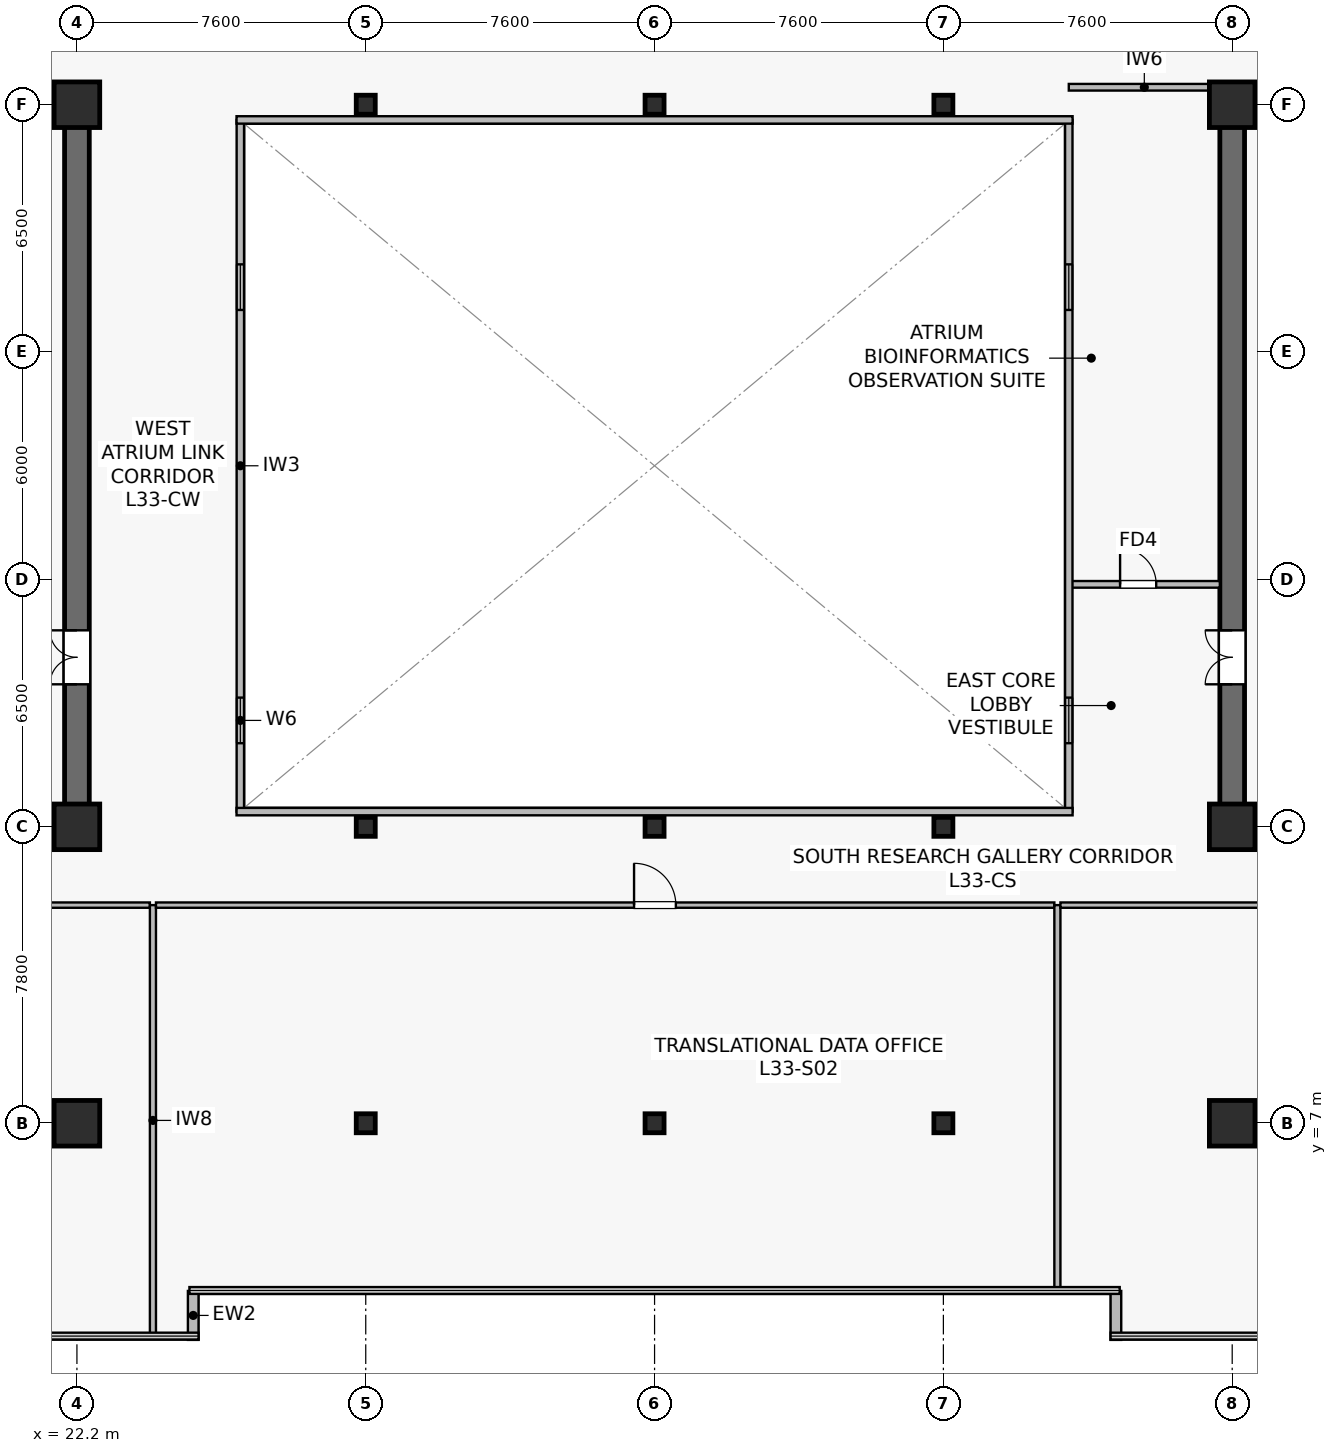
"""IFC4 building model, lengths in metres.
Left out: names, types, materials, properties, quantities, classifications, styles, units other than length and angle.
Written with IfcOpenShell. Run it as: python <this file> out.ifc"""

import sys

from ifc_helpers import new_model, si_unit, direction, frame, frame_2d, origin, origin_2d, place, context, subcontext, project, spatial, rectangle, hollow_rectangle, extrude, source, transform, mapped, element, fill, save


model = new_model("IFC4")
c1 = context("Model", 3, precision=1e-05, world=origin(), true_north=direction((0.0, 1.0)))
c2 = subcontext(c1, "Body", "Model", "MODEL_VIEW")
j1 = project(units=[si_unit("LENGTHUNIT", "METRE"), si_unit("PLANEANGLEUNIT", "RADIAN")], contexts=[c1])
p1 = place(None, origin())
s1 = spatial("IfcSite", under=j1, at=p1, CompositionType="ELEMENT")
p2 = place(p1, origin())
s2 = spatial("IfcBuilding", under=s1, at=p2, CompositionType="ELEMENT")
p3 = place(p2, frame((0.0, 0.0, 137.9)))
s3 = spatial("IfcBuildingStorey", under=s2, at=p3, CompositionType="ELEMENT", Elevation=137.9)
p4 = place(p3, frame((7.075, 14.8, 0.0), z_axis=(0.0, 0.0, 1.0), x_axis=(1.0, 0.0, 0.0)))
e1 = element("IfcWall", 1, at=p4, inside=s3, PredefinedType="SHEAR", context=c2, shape_type="SweptSolid", body=[
    extrude(rectangle(XDim=15.45, YDim=0.65, at=frame_2d((7.725, 0.0))), origin(), (0.0, 0.0, 1.0), 3.79),
])
p5 = place(p3, frame((7.075, 33.8, 0.0), z_axis=(0.0, 0.0, 1.0), x_axis=(1.0, 0.0, 0.0)))
e2 = element("IfcWall", 2, at=p5, inside=s3, PredefinedType="SHEAR", context=c2, shape_type="SweptSolid", body=[
    extrude(rectangle(XDim=15.45, YDim=0.65, at=frame_2d((7.725, 0.0))), origin(), (0.0, 0.0, 1.0), 3.79),
])
p6 = place(p5, frame((5.25, 0.0, 0.0)))
e3 = element("IfcOpeningElement", 3, at=p6, cuts=e2, PredefinedType="OPENING", context=c2, shape_type="SweptSolid", body=[
    extrude(rectangle(XDim=0.95, YDim=2.15, at=frame_2d((0.475, 1.075))), frame((0.0, 0.335, 0.0), z_axis=(0.0, -1.0, 0.0), x_axis=(1.0, 0.0, 0.0)), (0.0, 0.0, 1.0), 0.67),
])
p7 = place(p5, frame((7.765, 0.0, 0.0)))
e4 = element("IfcOpeningElement", 4, at=p7, cuts=e2, PredefinedType="OPENING", context=c2, shape_type="SweptSolid", body=[
    extrude(rectangle(XDim=0.95, YDim=2.15, at=frame_2d((0.475, 1.075))), frame((0.0, 0.335, 0.0), z_axis=(0.0, -1.0, 0.0), x_axis=(1.0, 0.0, 0.0)), (0.0, 0.0, 1.0), 0.67),
])
p8 = place(p5, frame((10.315, 0.0, 0.0)))
e5 = element("IfcOpeningElement", 5, at=p8, cuts=e2, PredefinedType="OPENING", context=c2, shape_type="SweptSolid", body=[
    extrude(rectangle(XDim=0.95, YDim=2.15, at=frame_2d((0.475, 1.075))), frame((0.0, 0.335, 0.0), z_axis=(0.0, -1.0, 0.0), x_axis=(1.0, 0.0, 0.0)), (0.0, 0.0, 1.0), 0.67),
])
p9 = place(p5, frame((12.865, 0.0, 0.0)))
e6 = element("IfcOpeningElement", 6, at=p9, cuts=e2, PredefinedType="OPENING", context=c2, shape_type="SweptSolid", body=[
    extrude(rectangle(XDim=0.95, YDim=2.15, at=frame_2d((0.475, 1.075))), frame((0.0, 0.335, 0.0), z_axis=(0.0, -1.0, 0.0), x_axis=(1.0, 0.0, 0.0)), (0.0, 0.0, 1.0), 0.67),
])
p10 = place(p3, frame((22.2, 15.125, 0.0), z_axis=(0.0, 0.0, 1.0), x_axis=(0.0, 1.0, 0.0)))
e7 = element("IfcWall", 7, at=p10, inside=s3, PredefinedType="SHEAR", context=c2, shape_type="SweptSolid", body=[
    extrude(rectangle(XDim=18.35, YDim=0.65, at=frame_2d((9.175, 0.0))), origin(), (0.0, 0.0, 1.0), 3.79),
])
p11 = place(p10, frame((3.425, 0.0, 0.0)))
e8 = element("IfcOpeningElement", 8, at=p11, cuts=e7, PredefinedType="OPENING", context=c2, shape_type="SweptSolid", body=[
    extrude(rectangle(XDim=1.42, YDim=2.2, at=frame_2d((0.71, 1.1))), frame((0.0, 0.335, 0.0), z_axis=(0.0, -1.0, 0.0), x_axis=(1.0, 0.0, 0.0)), (0.0, 0.0, 1.0), 0.67),
])
p12 = place(p3, frame((52.275, 14.8, 0.0), z_axis=(0.0, 0.0, 1.0), x_axis=(1.0, 0.0, 0.0)))
e9 = element("IfcWall", 9, at=p12, inside=s3, PredefinedType="SHEAR", context=c2, shape_type="SweptSolid", body=[
    extrude(rectangle(XDim=15.45, YDim=0.65, at=frame_2d((7.725, 0.0))), origin(), (0.0, 0.0, 1.0), 3.79),
])
p13 = place(p3, frame((52.275, 33.8, 0.0), z_axis=(0.0, 0.0, 1.0), x_axis=(1.0, 0.0, 0.0)))
e10 = element("IfcWall", 10, at=p13, inside=s3, PredefinedType="SHEAR", context=c2, shape_type="SweptSolid", body=[
    extrude(rectangle(XDim=15.45, YDim=0.65, at=frame_2d((7.725, 0.0))), origin(), (0.0, 0.0, 1.0), 3.79),
])
p14 = place(p13, frame((9.25, 0.0, 0.0)))
e11 = element("IfcOpeningElement", 11, at=p14, cuts=e10, PredefinedType="OPENING", context=c2, shape_type="SweptSolid", body=[
    extrude(rectangle(XDim=0.95, YDim=2.15, at=frame_2d((0.475, 1.075))), frame((0.0, 0.335, 0.0), z_axis=(0.0, -1.0, 0.0), x_axis=(1.0, 0.0, 0.0)), (0.0, 0.0, 1.0), 0.67),
])
p15 = place(p13, frame((6.735, 0.0, 0.0)))
e12 = element("IfcOpeningElement", 12, at=p15, cuts=e10, PredefinedType="OPENING", context=c2, shape_type="SweptSolid", body=[
    extrude(rectangle(XDim=0.95, YDim=2.15, at=frame_2d((0.475, 1.075))), frame((0.0, 0.335, 0.0), z_axis=(0.0, -1.0, 0.0), x_axis=(1.0, 0.0, 0.0)), (0.0, 0.0, 1.0), 0.67),
])
p16 = place(p13, frame((4.185, 0.0, 0.0)))
e13 = element("IfcOpeningElement", 13, at=p16, cuts=e10, PredefinedType="OPENING", context=c2, shape_type="SweptSolid", body=[
    extrude(rectangle(XDim=0.95, YDim=2.15, at=frame_2d((0.475, 1.075))), frame((0.0, 0.335, 0.0), z_axis=(0.0, -1.0, 0.0), x_axis=(1.0, 0.0, 0.0)), (0.0, 0.0, 1.0), 0.67),
])
p17 = place(p13, frame((1.635, 0.0, 0.0)))
e14 = element("IfcOpeningElement", 14, at=p17, cuts=e10, PredefinedType="OPENING", context=c2, shape_type="SweptSolid", body=[
    extrude(rectangle(XDim=0.95, YDim=2.15, at=frame_2d((0.475, 1.075))), frame((0.0, 0.335, 0.0), z_axis=(0.0, -1.0, 0.0), x_axis=(1.0, 0.0, 0.0)), (0.0, 0.0, 1.0), 0.67),
])
p18 = place(p3, frame((52.6, 15.125, 0.0), z_axis=(0.0, 0.0, 1.0), x_axis=(0.0, 1.0, 0.0)))
e15 = element("IfcWall", 15, at=p18, inside=s3, PredefinedType="SHEAR", context=c2, shape_type="SweptSolid", body=[
    extrude(rectangle(XDim=18.35, YDim=0.65, at=frame_2d((9.175, 0.0))), origin(), (0.0, 0.0, 1.0), 3.79),
])
p19 = place(p18, frame((3.425, 0.0, 0.0)))
e16 = element("IfcOpeningElement", 16, at=p19, cuts=e15, PredefinedType="OPENING", context=c2, shape_type="SweptSolid", body=[
    extrude(rectangle(XDim=1.42, YDim=2.2, at=frame_2d((0.71, 1.1))), frame((0.0, 0.335, 0.0), z_axis=(0.0, -1.0, 0.0), x_axis=(1.0, 0.0, 0.0)), (0.0, 0.0, 1.0), 0.67),
])
m1 = source(origin(), c2, "Body", "SweptSolid", [
    extrude(rectangle(XDim=1.2, YDim=1.2, at=origin_2d()), origin(), (0.0, 0.0, 1.0), 4.1),
])
for number, where, z_axis, x_axis in (
    (17, (22.2, 7.0, 0.0), (0.0, 0.0, 1.0), (1.0, 0.0, 0.0)),
    (18, (22.2, 14.8, 0.0), (0.0, 0.0, 1.0), (1.0, 0.0, 0.0)),
    (19, (22.2, 33.8, 0.0), (0.0, 0.0, 1.0), (1.0, 0.0, 0.0)),
    (20, (52.6, 7.0, 0.0), (0.0, 0.0, 1.0), (1.0, 0.0, 0.0)),
    (21, (52.6, 14.8, 0.0), (0.0, 0.0, 1.0), (1.0, 0.0, 0.0)),
    (22, (52.6, 33.8, 0.0), (0.0, 0.0, 1.0), (1.0, 0.0, 0.0)),
):
    element("IfcColumn", number, at=place(p3, frame(where, z_axis=z_axis, x_axis=x_axis)), inside=s3, PredefinedType="COLUMN", context=c2, shape_type="MappedRepresentation", body=[
        mapped(m1, transform((0.0, 0.0, 0.0), scale=1.0)),
    ])
m2 = source(origin(), c2, "Body", "SweptSolid", [
    extrude(hollow_rectangle(XDim=0.5, YDim=0.5, WallThickness=0.022, at=origin_2d()), origin(), (0.0, 0.0, 1.0), 4.1),
])
for number, where, z_axis, x_axis in (
    (23, (29.8, 7.0, 0.0), (0.0, 0.0, 1.0), (1.0, 0.0, 0.0)),
    (24, (29.8, 14.8, 0.0), (0.0, 0.0, 1.0), (1.0, 0.0, 0.0)),
    (25, (29.8, 33.8, 0.0), (0.0, 0.0, 1.0), (1.0, 0.0, 0.0)),
    (26, (37.4, 7.0, 0.0), (0.0, 0.0, 1.0), (1.0, 0.0, 0.0)),
    (27, (37.4, 14.8, 0.0), (0.0, 0.0, 1.0), (1.0, 0.0, 0.0)),
    (28, (37.4, 33.8, 0.0), (0.0, 0.0, 1.0), (1.0, 0.0, 0.0)),
    (29, (45.0, 7.0, 0.0), (0.0, 0.0, 1.0), (1.0, 0.0, 0.0)),
    (30, (45.0, 14.8, 0.0), (0.0, 0.0, 1.0), (1.0, 0.0, 0.0)),
    (31, (45.0, 33.8, 0.0), (0.0, 0.0, 1.0), (1.0, 0.0, 0.0)),
):
    element("IfcColumn", number, at=place(p3, frame(where, z_axis=z_axis, x_axis=x_axis)), inside=s3, PredefinedType="COLUMN", context=c2, shape_type="MappedRepresentation", body=[
        mapped(m2, transform((0.0, 0.0, 0.0), scale=1.0)),
    ])
for number, where, z_axis, x_axis in (
    (32, (25.26, 1.3, 0.0), (0.0, 0.0, 1.0), (0.0, 1.0, 0.0)),
    (33, (49.54, 2.588, 0.0), (0.0, 0.0, 1.0), (0.0, -1.0, 0.0)),
):
    element("IfcWall", number, at=place(p3, frame(where, z_axis=z_axis, x_axis=x_axis)), inside=s3, PredefinedType="STANDARD", context=c2, shape_type="SweptSolid", body=[
        extrude(rectangle(XDim=1.288, YDim=0.28, at=frame_2d((0.644, 0.0))), origin(), (0.0, 0.0, 1.0), 3.79),
    ])
p20 = place(p3, frame((48.3, 34.26, 0.0), z_axis=(0.0, 0.0, 1.0), x_axis=(1.0, 0.0, 0.0)))
e34 = element("IfcWall", 34, at=p20, inside=s3, PredefinedType="PARTITIONING", context=c2, shape_type="SweptSolid", body=[
    extrude(rectangle(XDim=3.975, YDim=0.175, at=frame_2d((1.987, 0.0))), origin(), (0.0, 0.0, 1.0), 3.475),
])
p21 = place(p3, frame((48.3, 21.18, 0.0), z_axis=(0.0, 0.0, 1.0), x_axis=(1.0, 0.0, 0.0)))
e35 = element("IfcWall", 35, at=p21, inside=s3, PredefinedType="PARTITIONING", context=c2, shape_type="SweptSolid", body=[
    extrude(rectangle(XDim=3.975, YDim=0.175, at=frame_2d((1.987, 0.0))), origin(), (0.0, 0.0, 1.0), 3.79),
])
p22 = place(p21, frame((1.35, 0.0, 0.0)))
e36 = element("IfcOpeningElement", 36, at=p22, cuts=e35, PredefinedType="OPENING", context=c2, shape_type="SweptSolid", body=[
    extrude(rectangle(XDim=0.95, YDim=2.15, at=frame_2d((0.475, 1.075))), frame((0.0, 0.098, 0.0), z_axis=(0.0, -1.0, 0.0), x_axis=(1.0, 0.0, 0.0)), (0.0, 0.0, 1.0), 0.195),
])
p23 = place(p3, frame((26.5, 15.2, 0.0), z_axis=(0.0, 0.0, 1.0), x_axis=(0.0, 1.0, 0.0)))
e37 = element("IfcWall", 37, at=p23, inside=s3, PredefinedType="SOLIDWALL", context=c2, shape_type="SweptSolid", body=[
    extrude(rectangle(XDim=18.2, YDim=0.195, at=frame_2d((9.1, 0.0))), origin(), (0.0, 0.0, 1.0), 3.79),
])
p24 = place(p23, frame((1.8, 0.0, 0.9)))
e38 = element("IfcOpeningElement", 38, at=p24, cuts=e37, PredefinedType="OPENING", context=c2, shape_type="SweptSolid", body=[
    extrude(rectangle(XDim=1.2, YDim=1.35, at=frame_2d((0.6, 0.675))), frame((0.0, 0.107, 0.0), z_axis=(0.0, -1.0, 0.0), x_axis=(1.0, 0.0, 0.0)), (0.0, 0.0, 1.0), 0.215),
])
p25 = place(p23, frame((13.2, 0.0, 0.9)))
e39 = element("IfcOpeningElement", 39, at=p25, cuts=e37, PredefinedType="OPENING", context=c2, shape_type="SweptSolid", body=[
    extrude(rectangle(XDim=1.2, YDim=1.35, at=frame_2d((0.6, 0.675))), frame((0.0, 0.107, 0.0), z_axis=(0.0, -1.0, 0.0), x_axis=(1.0, 0.0, 0.0)), (0.0, 0.0, 1.0), 0.215),
])
p26 = place(p3, frame((48.3, 15.2, 0.0), z_axis=(0.0, 0.0, 1.0), x_axis=(0.0, 1.0, 0.0)))
e40 = element("IfcWall", 40, at=p26, inside=s3, PredefinedType="SOLIDWALL", context=c2, shape_type="SweptSolid", body=[
    extrude(rectangle(XDim=18.2, YDim=0.195, at=frame_2d((9.1, 0.0))), origin(), (0.0, 0.0, 1.0), 3.79),
])
p27 = place(p26, frame((1.8, 0.0, 0.9)))
e41 = element("IfcOpeningElement", 41, at=p27, cuts=e40, PredefinedType="OPENING", context=c2, shape_type="SweptSolid", body=[
    extrude(rectangle(XDim=1.2, YDim=1.35, at=frame_2d((0.6, 0.675))), frame((0.0, 0.107, 0.0), z_axis=(0.0, -1.0, 0.0), x_axis=(1.0, 0.0, 0.0)), (0.0, 0.0, 1.0), 0.215),
])
p28 = place(p26, frame((13.2, 0.0, 0.9)))
e42 = element("IfcOpeningElement", 42, at=p28, cuts=e40, PredefinedType="OPENING", context=c2, shape_type="SweptSolid", body=[
    extrude(rectangle(XDim=1.2, YDim=1.35, at=frame_2d((0.6, 0.675))), frame((0.0, 0.107, 0.0), z_axis=(0.0, -1.0, 0.0), x_axis=(1.0, 0.0, 0.0)), (0.0, 0.0, 1.0), 0.215),
])
for number, where, z_axis, x_axis in (
    (43, (26.4, 15.2, 0.0), (0.0, 0.0, 1.0), (1.0, 0.0, 0.0)),
    (44, (26.4, 33.4, 0.0), (0.0, 0.0, 1.0), (1.0, 0.0, 0.0)),
):
    element("IfcWall", number, at=place(p3, frame(where, z_axis=z_axis, x_axis=x_axis)), inside=s3, PredefinedType="SOLIDWALL", context=c2, shape_type="SweptSolid", body=[
        extrude(rectangle(XDim=22.0, YDim=0.195, at=frame_2d((11.0, 0.0))), origin(), (0.0, 0.0, 1.0), 3.79),
    ])
p29 = place(p3, frame((6.98, 12.74, 0.0), z_axis=(0.0, 0.0, 1.0), x_axis=(1.0, 0.0, 0.0)))
e45 = element("IfcWall", 45, at=p29, inside=s3, PredefinedType="PARTITIONING", context=c2, shape_type="SweptSolid", body=[
    extrude(rectangle(XDim=17.14, YDim=0.14, at=frame_2d((8.57, 0.0))), origin(), (0.0, 0.0, 1.0), 3.125),
])
p30 = place(p29, frame((7.1, 0.0, 0.0)))
e46 = element("IfcOpeningElement", 46, at=p30, cuts=e45, PredefinedType="OPENING", context=c2, shape_type="SweptSolid", body=[
    extrude(rectangle(XDim=1.1, YDim=2.18, at=frame_2d((0.55, 1.09))), frame((0.0, 0.08, 0.0), z_axis=(0.0, -1.0, 0.0), x_axis=(1.0, 0.0, 0.0)), (0.0, 0.0, 1.0), 0.16),
])
p31 = place(p3, frame((24.2, 1.41, 0.0), z_axis=(0.0, 0.0, 1.0), x_axis=(0.0, 1.0, 0.0)))
e47 = element("IfcWall", 47, at=p31, inside=s3, PredefinedType="PARTITIONING", context=c2, shape_type="SweptSolid", body=[
    extrude(rectangle(XDim=11.33, YDim=0.16, at=frame_2d((5.665, 0.0))), origin(), (0.0, 0.0, 1.0), 3.075),
])
p32 = place(p3, frame((24.28, 12.74, 0.0), z_axis=(0.0, 0.0, 1.0), x_axis=(1.0, 0.0, 0.0)))
e48 = element("IfcWall", 48, at=p32, inside=s3, PredefinedType="PARTITIONING", context=c2, shape_type="SweptSolid", body=[
    extrude(rectangle(XDim=23.64, YDim=0.14, at=frame_2d((11.82, 0.0))), origin(), (0.0, 0.0, 1.0), 3.125),
])
p33 = place(p32, frame((12.58, 0.0, 0.0)))
e49 = element("IfcOpeningElement", 49, at=p33, cuts=e48, PredefinedType="OPENING", context=c2, shape_type="SweptSolid", body=[
    extrude(rectangle(XDim=1.1, YDim=2.18, at=frame_2d((0.55, 1.09))), frame((0.0, 0.08, 0.0), z_axis=(0.0, -1.0, 0.0), x_axis=(1.0, 0.0, 0.0)), (0.0, 0.0, 1.0), 0.16),
])
p34 = place(p3, frame((48.0, 2.61, 0.0), z_axis=(0.0, 0.0, 1.0), x_axis=(0.0, 1.0, 0.0)))
e50 = element("IfcWall", 50, at=p34, inside=s3, PredefinedType="PARTITIONING", context=c2, shape_type="SweptSolid", body=[
    extrude(rectangle(XDim=10.13, YDim=0.16, at=frame_2d((5.065, 0.0))), origin(), (0.0, 0.0, 1.0), 3.075),
])
p35 = place(p3, frame((48.08, 12.74, 0.0), z_axis=(0.0, 0.0, 1.0), x_axis=(1.0, 0.0, 0.0)))
e51 = element("IfcWall", 51, at=p35, inside=s3, PredefinedType="PARTITIONING", context=c2, shape_type="SweptSolid", body=[
    extrude(rectangle(XDim=19.74, YDim=0.14, at=frame_2d((9.87, 0.0))), origin(), (0.0, 0.0, 1.0), 3.125),
])
p36 = place(p35, frame((8.244, 0.0, 0.0)))
e52 = element("IfcOpeningElement", 52, at=p36, cuts=e51, PredefinedType="OPENING", context=c2, shape_type="SweptSolid", body=[
    extrude(rectangle(XDim=1.1, YDim=2.18, at=frame_2d((0.55, 1.09))), frame((0.0, 0.08, 0.0), z_axis=(0.0, -1.0, 0.0), x_axis=(1.0, 0.0, 0.0)), (0.0, 0.0, 1.0), 0.16),
])
m3 = source(origin(), c2, "Body", "SweptSolid", [
    extrude(rectangle(XDim=1.2, YDim=1.35, at=frame_2d((0.6, 0.675))), frame((0.0, 0.03, 0.0), z_axis=(0.0, -1.0, 0.0), x_axis=(1.0, 0.0, 0.0)), (0.0, 0.0, 1.0), 0.06),
])
p37 = place(p24, origin())
e53 = element("IfcWindow", 53, at=p37, inside=s3, PartitioningType="SINGLE_PANEL", PredefinedType="WINDOW", context=c2, shape_type="MappedRepresentation", body=[
    mapped(m3, transform((0.0, 0.0, 0.0), scale=1.0)),
])
fill(e38, e53)
p38 = place(p25, origin())
e54 = element("IfcWindow", 54, at=p38, inside=s3, PartitioningType="SINGLE_PANEL", PredefinedType="WINDOW", context=c2, shape_type="MappedRepresentation", body=[
    mapped(m3, transform((0.0, 0.0, 0.0), scale=1.0)),
])
fill(e39, e54)
p39 = place(p27, origin())
e55 = element("IfcWindow", 55, at=p39, inside=s3, PartitioningType="SINGLE_PANEL", PredefinedType="WINDOW", context=c2, shape_type="MappedRepresentation", body=[
    mapped(m3, transform((0.0, 0.0, 0.0), scale=1.0)),
])
fill(e41, e55)
p40 = place(p28, origin())
e56 = element("IfcWindow", 56, at=p40, inside=s3, PartitioningType="SINGLE_PANEL", PredefinedType="WINDOW", context=c2, shape_type="MappedRepresentation", body=[
    mapped(m3, transform((0.0, 0.0, 0.0), scale=1.0)),
])
fill(e42, e56)
m4 = source(origin(), c2, "Body", "SweptSolid", [
    extrude(rectangle(XDim=1.42, YDim=2.2, at=frame_2d((0.71, 1.1))), frame((0.0, 0.025, 0.0), z_axis=(0.0, -1.0, 0.0), x_axis=(1.0, 0.0, 0.0)), (0.0, 0.0, 1.0), 0.05),
])
p41 = place(p11, origin())
e57 = element("IfcDoor", 57, at=p41, inside=s3, OperationType="DOUBLE_DOOR_SINGLE_SWING", PredefinedType="DOOR", context=c2, shape_type="MappedRepresentation", body=[
    mapped(m4, transform((0.0, 0.0, 0.0), scale=1.0)),
])
fill(e8, e57)
p42 = place(p19, origin())
e58 = element("IfcDoor", 58, at=p42, inside=s3, OperationType="DOUBLE_DOOR_SINGLE_SWING", PredefinedType="DOOR", context=c2, shape_type="MappedRepresentation", body=[
    mapped(m4, transform((0.0, 0.0, 0.0), scale=1.0)),
])
fill(e16, e58)
m5 = source(origin(), c2, "Body", "SweptSolid", [
    extrude(rectangle(XDim=0.95, YDim=2.15, at=frame_2d((0.475, 1.075))), frame((0.0, 0.025, 0.0), z_axis=(0.0, -1.0, 0.0), x_axis=(1.0, 0.0, 0.0)), (0.0, 0.0, 1.0), 0.05),
])
p43 = place(p22, origin())
e59 = element("IfcDoor", 59, at=p43, inside=s3, OperationType="SINGLE_SWING_LEFT", PredefinedType="DOOR", context=c2, shape_type="MappedRepresentation", body=[
    mapped(m5, transform((0.0, 0.0, 0.0), scale=1.0)),
])
fill(e36, e59)
m6 = source(origin(), c2, "Body", "SweptSolid", [
    extrude(rectangle(XDim=1.1, YDim=2.18, at=frame_2d((0.55, 1.09))), frame((0.0, 0.025, 0.0), z_axis=(0.0, -1.0, 0.0), x_axis=(1.0, 0.0, 0.0)), (0.0, 0.0, 1.0), 0.05),
])
p44 = place(p33, origin())
e60 = element("IfcDoor", 60, at=p44, inside=s3, OperationType="SINGLE_SWING_LEFT", PredefinedType="DOOR", context=c2, shape_type="MappedRepresentation", body=[
    mapped(m6, transform((0.0, 0.0, 0.0), scale=1.0)),
])
fill(e49, e60)
save(model, sys.argv[1])
